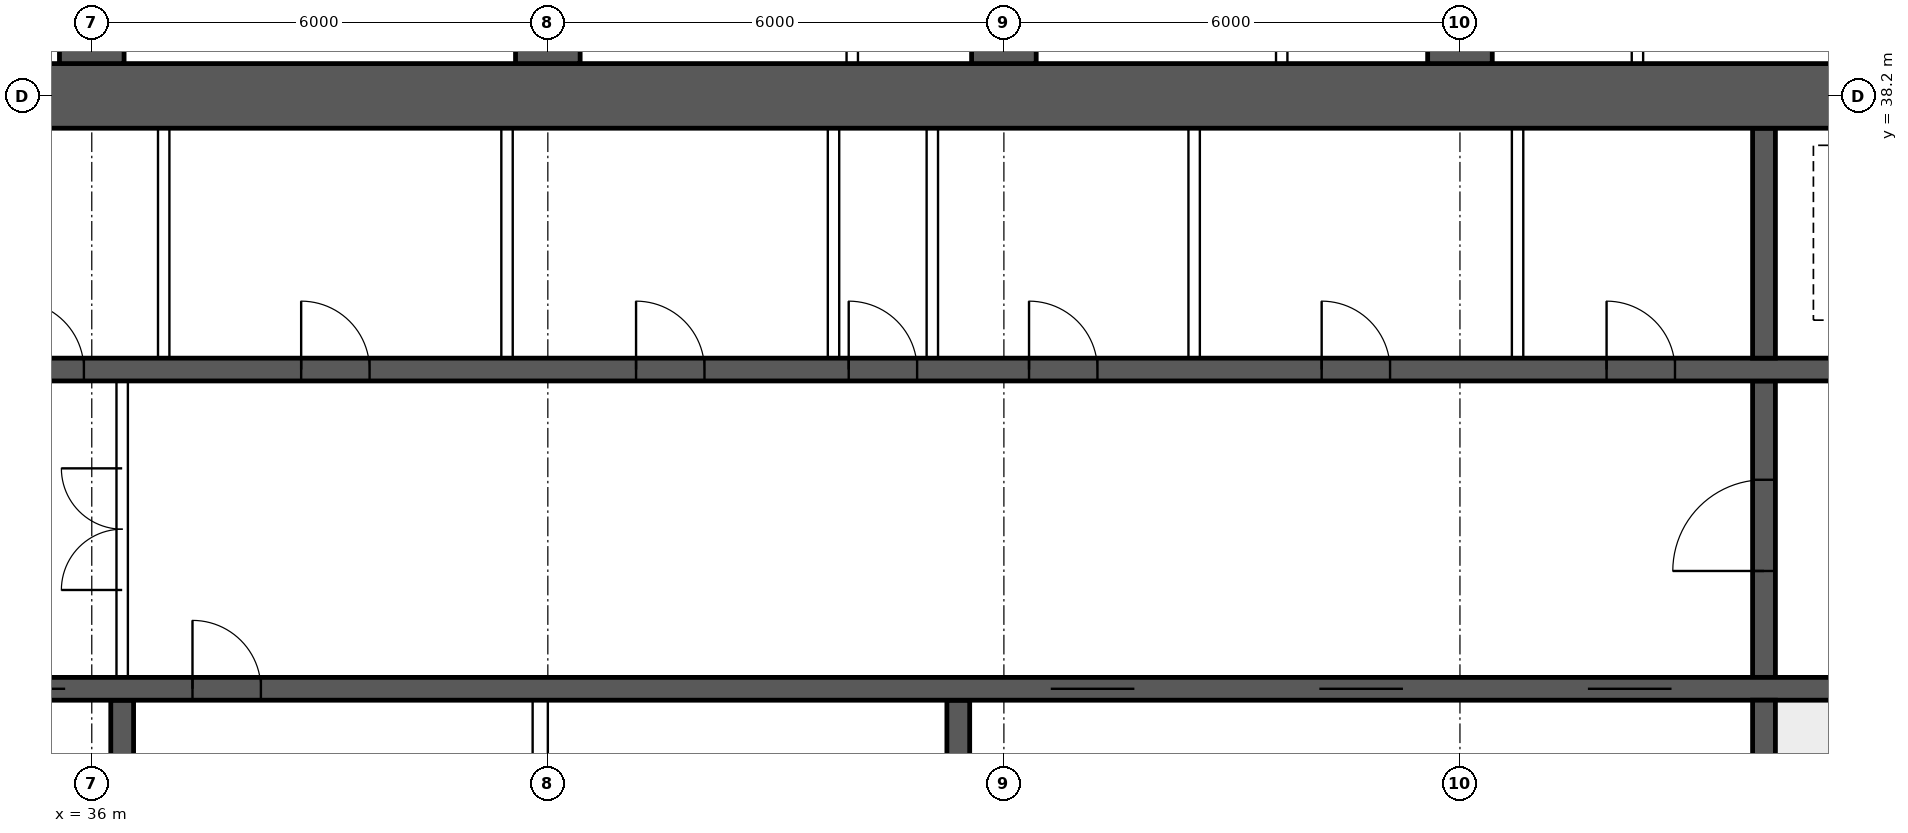
"""IFC4 building model, lengths in metres.
Left out: names, types, materials, properties, quantities, classifications, styles, units other than length and angle.
Written with IfcOpenShell. Run it as: python <this file> out.ifc"""

import sys

from ifc_helpers import new_model, si_unit, direction, frame, frame_2d, origin, place, context, subcontext, project, spatial, rectangle, extrude, element, fill, save


model = new_model("IFC4")
c1 = context("Model", 3, precision=1e-05, world=origin(), true_north=direction((0.0, 1.0)))
c2 = subcontext(c1, "Body", "Model", "MODEL_VIEW")
j1 = project(units=[si_unit("LENGTHUNIT", "METRE"), si_unit("PLANEANGLEUNIT", "RADIAN")], contexts=[c1])
p1 = place(None, origin())
s1 = spatial("IfcSite", under=j1, at=p1, CompositionType="ELEMENT")
p2 = place(p1, origin())
s2 = spatial("IfcBuilding", under=s1, at=p2, CompositionType="ELEMENT")
p3 = place(p2, frame((0.0, 0.0, 163.6)))
s3 = spatial("IfcBuildingStorey", under=s2, at=p3, CompositionType="ELEMENT", Elevation=163.6)
p4 = place(p3, frame((18.0, 38.2, 0.0), z_axis=(0.0, 0.0, 1.0), x_axis=(1.0, 0.0, 0.0)))
e1 = element("IfcWall", 1, at=p4, inside=s3, PredefinedType="SHEAR", context=c2, shape_type="SweptSolid", body=[
    extrude(rectangle(XDim=48.0, YDim=0.85, at=frame_2d((24.0, 0.0))), origin(), (0.0, 0.0, 1.0), 3.75),
])
p5 = place(p3, frame((18.425, 30.4, 0.0), z_axis=(0.0, 0.0, 1.0), x_axis=(1.0, 0.0, 0.0)))
e2 = element("IfcWall", 2, at=p5, inside=s3, PredefinedType="SHEAR", context=c2, shape_type="SweptSolid", body=[
    extrude(rectangle(XDim=47.15, YDim=0.3, at=frame_2d((23.575, 0.0))), origin(), (0.0, 0.0, 1.0), 3.75),
])
p6 = place(p5, frame((0.4, 0.0, 0.0)))
e3 = element("IfcOpeningElement", 3, at=p6, cuts=e2, PredefinedType="OPENING", context=c2, shape_type="SweptSolid", body=[
    extrude(rectangle(XDim=1.0, YDim=2.1, at=frame_2d((0.5, 1.05))), frame((0.0, 0.16, 0.0), z_axis=(0.0, -1.0, 0.0), x_axis=(1.0, 0.0, 0.0)), (0.0, 0.0, 1.0), 0.32),
])
p7 = place(p5, frame((45.75, 0.0, 0.0)))
e4 = element("IfcOpeningElement", 4, at=p7, cuts=e2, PredefinedType="OPENING", context=c2, shape_type="SweptSolid", body=[
    extrude(rectangle(XDim=1.0, YDim=2.1, at=frame_2d((0.5, 1.05))), frame((0.0, 0.16, 0.0), z_axis=(0.0, -1.0, 0.0), x_axis=(1.0, 0.0, 0.0)), (0.0, 0.0, 1.0), 0.32),
])
p8 = place(p5, frame((8.325, 0.0, 0.0)))
e5 = element("IfcOpeningElement", 5, at=p8, cuts=e2, PredefinedType="OPENING", context=c2, shape_type="SweptSolid", body=[
    extrude(rectangle(XDim=1.1, YDim=2.1, at=frame_2d((0.55, 1.05))), frame((0.0, 0.16, 0.0), z_axis=(0.0, -1.0, 0.0), x_axis=(1.0, 0.0, 0.0)), (0.0, 0.0, 1.0), 0.32),
])
p9 = place(p5, frame((10.925, 0.0, 0.0)))
e6 = element("IfcOpeningElement", 6, at=p9, cuts=e2, PredefinedType="OPENING", context=c2, shape_type="SweptSolid", body=[
    extrude(rectangle(XDim=1.1, YDim=2.1, at=frame_2d((0.55, 1.05))), frame((0.0, 0.16, 0.0), z_axis=(0.0, -1.0, 0.0), x_axis=(1.0, 0.0, 0.0)), (0.0, 0.0, 1.0), 0.32),
])
p10 = place(p5, frame((13.525, 0.0, 0.0)))
e7 = element("IfcOpeningElement", 7, at=p10, cuts=e2, PredefinedType="OPENING", context=c2, shape_type="SweptSolid", body=[
    extrude(rectangle(XDim=1.1, YDim=2.1, at=frame_2d((0.55, 1.05))), frame((0.0, 0.16, 0.0), z_axis=(0.0, -1.0, 0.0), x_axis=(1.0, 0.0, 0.0)), (0.0, 0.0, 1.0), 0.32),
])
p11 = place(p5, frame((16.125, 0.0, 0.0)))
e8 = element("IfcOpeningElement", 8, at=p11, cuts=e2, PredefinedType="OPENING", context=c2, shape_type="SweptSolid", body=[
    extrude(rectangle(XDim=1.1, YDim=2.1, at=frame_2d((0.55, 1.05))), frame((0.0, 0.16, 0.0), z_axis=(0.0, -1.0, 0.0), x_axis=(1.0, 0.0, 0.0)), (0.0, 0.0, 1.0), 0.32),
])
p12 = place(p5, frame((18.9, 0.0, 0.0)))
e9 = element("IfcOpeningElement", 9, at=p12, cuts=e2, PredefinedType="OPENING", context=c2, shape_type="SweptSolid", body=[
    extrude(rectangle(XDim=0.9, YDim=2.1, at=frame_2d((0.45, 1.05))), frame((0.0, 0.16, 0.0), z_axis=(0.0, -1.0, 0.0), x_axis=(1.0, 0.0, 0.0)), (0.0, 0.0, 1.0), 0.32),
])
p13 = place(p5, frame((30.192, 0.0, 0.0)))
e10 = element("IfcOpeningElement", 10, at=p13, cuts=e2, PredefinedType="OPENING", context=c2, shape_type="SweptSolid", body=[
    extrude(rectangle(XDim=1.1, YDim=2.1, at=frame_2d((0.55, 1.05))), frame((0.0, 0.16, 0.0), z_axis=(0.0, -1.0, 0.0), x_axis=(1.0, 0.0, 0.0)), (0.0, 0.0, 1.0), 0.32),
])
p14 = place(p5, frame((33.725, 0.0, 0.0)))
e11 = element("IfcOpeningElement", 11, at=p14, cuts=e2, PredefinedType="OPENING", context=c2, shape_type="SweptSolid", body=[
    extrude(rectangle(XDim=1.1, YDim=2.1, at=frame_2d((0.55, 1.05))), frame((0.0, 0.16, 0.0), z_axis=(0.0, -1.0, 0.0), x_axis=(1.0, 0.0, 0.0)), (0.0, 0.0, 1.0), 0.32),
])
p15 = place(p5, frame((37.258, 0.0, 0.0)))
e12 = element("IfcOpeningElement", 12, at=p15, cuts=e2, PredefinedType="OPENING", context=c2, shape_type="SweptSolid", body=[
    extrude(rectangle(XDim=1.1, YDim=2.1, at=frame_2d((0.55, 1.05))), frame((0.0, 0.16, 0.0), z_axis=(0.0, -1.0, 0.0), x_axis=(1.0, 0.0, 0.0)), (0.0, 0.0, 1.0), 0.32),
])
p16 = place(p3, frame((18.425, 34.6, 0.0), z_axis=(0.0, 0.0, 1.0), x_axis=(1.0, 0.0, 0.0)))
e13 = element("IfcWall", 13, at=p16, inside=s3, PredefinedType="SHEAR", context=c2, shape_type="SweptSolid", body=[
    extrude(rectangle(XDim=47.15, YDim=0.3, at=frame_2d((23.575, 0.0))), origin(), (0.0, 0.0, 1.0), 3.75),
])
p17 = place(p16, frame((0.9, 0.0, 0.0)))
e14 = element("IfcOpeningElement", 14, at=p17, cuts=e13, PredefinedType="OPENING", context=c2, shape_type="SweptSolid", body=[
    extrude(rectangle(XDim=1.1, YDim=2.1, at=frame_2d((0.55, 1.05))), frame((0.0, 0.16, 0.0), z_axis=(0.0, -1.0, 0.0), x_axis=(1.0, 0.0, 0.0)), (0.0, 0.0, 1.0), 0.32),
])
p18 = place(p16, frame((45.15, 0.0, 0.0)))
e15 = element("IfcOpeningElement", 15, at=p18, cuts=e13, PredefinedType="OPENING", context=c2, shape_type="SweptSolid", body=[
    extrude(rectangle(XDim=1.1, YDim=2.1, at=frame_2d((0.55, 1.05))), frame((0.0, 0.16, 0.0), z_axis=(0.0, -1.0, 0.0), x_axis=(1.0, 0.0, 0.0)), (0.0, 0.0, 1.0), 0.32),
])
p19 = place(p16, frame((4.175, 0.0, 0.0)))
e16 = element("IfcOpeningElement", 16, at=p19, cuts=e13, PredefinedType="OPENING", context=c2, shape_type="SweptSolid", body=[
    extrude(rectangle(XDim=0.9, YDim=2.1, at=frame_2d((0.45, 1.05))), frame((0.0, 0.16, 0.0), z_axis=(0.0, -1.0, 0.0), x_axis=(1.0, 0.0, 0.0)), (0.0, 0.0, 1.0), 0.32),
])
p20 = place(p16, frame((42.075, 0.0, 0.0)))
e17 = element("IfcOpeningElement", 17, at=p20, cuts=e13, PredefinedType="OPENING", context=c2, shape_type="SweptSolid", body=[
    extrude(rectangle(XDim=0.9, YDim=2.1, at=frame_2d((0.45, 1.05))), frame((0.0, 0.16, 0.0), z_axis=(0.0, -1.0, 0.0), x_axis=(1.0, 0.0, 0.0)), (0.0, 0.0, 1.0), 0.32),
])
p21 = place(p16, frame((8.95, 0.0, 0.0)))
e18 = element("IfcOpeningElement", 18, at=p21, cuts=e13, PredefinedType="OPENING", context=c2, shape_type="SweptSolid", body=[
    extrude(rectangle(XDim=0.9, YDim=2.1, at=frame_2d((0.45, 1.05))), frame((0.0, 0.16, 0.0), z_axis=(0.0, -1.0, 0.0), x_axis=(1.0, 0.0, 0.0)), (0.0, 0.0, 1.0), 0.32),
])
p22 = place(p16, frame((12.924, 0.0, 0.0)))
e19 = element("IfcOpeningElement", 19, at=p22, cuts=e13, PredefinedType="OPENING", context=c2, shape_type="SweptSolid", body=[
    extrude(rectangle(XDim=0.9, YDim=2.1, at=frame_2d((0.45, 1.05))), frame((0.0, 0.16, 0.0), z_axis=(0.0, -1.0, 0.0), x_axis=(1.0, 0.0, 0.0)), (0.0, 0.0, 1.0), 0.32),
])
p23 = place(p16, frame((16.571, 0.0, 0.0)))
e20 = element("IfcOpeningElement", 20, at=p23, cuts=e13, PredefinedType="OPENING", context=c2, shape_type="SweptSolid", body=[
    extrude(rectangle(XDim=0.9, YDim=2.1, at=frame_2d((0.45, 1.05))), frame((0.0, 0.16, 0.0), z_axis=(0.0, -1.0, 0.0), x_axis=(1.0, 0.0, 0.0)), (0.0, 0.0, 1.0), 0.32),
])
p24 = place(p16, frame((20.33, 0.0, 0.0)))
e21 = element("IfcOpeningElement", 21, at=p24, cuts=e13, PredefinedType="OPENING", context=c2, shape_type="SweptSolid", body=[
    extrude(rectangle(XDim=0.9, YDim=2.1, at=frame_2d((0.45, 1.05))), frame((0.0, 0.16, 0.0), z_axis=(0.0, -1.0, 0.0), x_axis=(1.0, 0.0, 0.0)), (0.0, 0.0, 1.0), 0.32),
])
p25 = place(p16, frame((24.736, 0.0, 0.0)))
e22 = element("IfcOpeningElement", 22, at=p25, cuts=e13, PredefinedType="OPENING", context=c2, shape_type="SweptSolid", body=[
    extrude(rectangle(XDim=0.9, YDim=2.1, at=frame_2d((0.45, 1.05))), frame((0.0, 0.16, 0.0), z_axis=(0.0, -1.0, 0.0), x_axis=(1.0, 0.0, 0.0)), (0.0, 0.0, 1.0), 0.32),
])
p26 = place(p16, frame((27.533, 0.0, 0.0)))
e23 = element("IfcOpeningElement", 23, at=p26, cuts=e13, PredefinedType="OPENING", context=c2, shape_type="SweptSolid", body=[
    extrude(rectangle(XDim=0.9, YDim=2.1, at=frame_2d((0.45, 1.05))), frame((0.0, 0.16, 0.0), z_axis=(0.0, -1.0, 0.0), x_axis=(1.0, 0.0, 0.0)), (0.0, 0.0, 1.0), 0.32),
])
p27 = place(p16, frame((29.906, 0.0, 0.0)))
e24 = element("IfcOpeningElement", 24, at=p27, cuts=e13, PredefinedType="OPENING", context=c2, shape_type="SweptSolid", body=[
    extrude(rectangle(XDim=0.9, YDim=2.1, at=frame_2d((0.45, 1.05))), frame((0.0, 0.16, 0.0), z_axis=(0.0, -1.0, 0.0), x_axis=(1.0, 0.0, 0.0)), (0.0, 0.0, 1.0), 0.32),
])
p28 = place(p16, frame((33.756, 0.0, 0.0)))
e25 = element("IfcOpeningElement", 25, at=p28, cuts=e13, PredefinedType="OPENING", context=c2, shape_type="SweptSolid", body=[
    extrude(rectangle(XDim=0.9, YDim=2.1, at=frame_2d((0.45, 1.05))), frame((0.0, 0.16, 0.0), z_axis=(0.0, -1.0, 0.0), x_axis=(1.0, 0.0, 0.0)), (0.0, 0.0, 1.0), 0.32),
])
p29 = place(p16, frame((37.504, 0.0, 0.0)))
e26 = element("IfcOpeningElement", 26, at=p29, cuts=e13, PredefinedType="OPENING", context=c2, shape_type="SweptSolid", body=[
    extrude(rectangle(XDim=0.9, YDim=2.1, at=frame_2d((0.45, 1.05))), frame((0.0, 0.16, 0.0), z_axis=(0.0, -1.0, 0.0), x_axis=(1.0, 0.0, 0.0)), (0.0, 0.0, 1.0), 0.32),
])
p30 = place(p3, frame((58.0, 26.225, 0.0), z_axis=(0.0, 0.0, 1.0), x_axis=(0.0, 1.0, 0.0)))
e27 = element("IfcWall", 27, at=p30, inside=s3, PredefinedType="SHEAR", context=c2, shape_type="SweptSolid", body=[
    extrude(rectangle(XDim=4.025, YDim=0.3, at=frame_2d((2.012, 0.0))), origin(), (0.0, 0.0, 1.0), 3.75),
])
p31 = place(p3, frame((58.0, 30.55, 0.0), z_axis=(0.0, 0.0, 1.0), x_axis=(0.0, 1.0, 0.0)))
e28 = element("IfcWall", 28, at=p31, inside=s3, PredefinedType="SHEAR", context=c2, shape_type="SweptSolid", body=[
    extrude(rectangle(XDim=3.9, YDim=0.3, at=frame_2d((1.95, 0.0))), origin(), (0.0, 0.0, 1.0), 3.75),
])
p32 = place(p31, frame((1.4, 0.0, 0.0)))
e29 = element("IfcOpeningElement", 29, at=p32, cuts=e28, PredefinedType="OPENING", context=c2, shape_type="SweptSolid", body=[
    extrude(rectangle(XDim=1.2, YDim=2.1, at=frame_2d((0.6, 1.05))), frame((0.0, 0.16, 0.0), z_axis=(0.0, -1.0, 0.0), x_axis=(1.0, 0.0, 0.0)), (0.0, 0.0, 1.0), 0.32),
])
p33 = place(p3, frame((58.0, 34.75, 0.0), z_axis=(0.0, 0.0, 1.0), x_axis=(0.0, 1.0, 0.0)))
e30 = element("IfcWall", 30, at=p33, inside=s3, PredefinedType="SHEAR", context=c2, shape_type="SweptSolid", body=[
    extrude(rectangle(XDim=3.025, YDim=0.3, at=frame_2d((1.512, 0.0))), origin(), (0.0, 0.0, 1.0), 3.75),
])
for number, where, z_axis, x_axis in (
    (31, (36.4, 26.225, 0.0), (0.0, 0.0, 1.0), (0.0, 1.0, 0.0)),
    (32, (47.4, 26.225, 0.0), (0.0, 0.0, 1.0), (0.0, 1.0, 0.0)),
):
    element("IfcWall", number, at=place(p3, frame(where, z_axis=z_axis, x_axis=x_axis)), inside=s3, PredefinedType="SHEAR", context=c2, shape_type="SweptSolid", body=[
        extrude(rectangle(XDim=4.025, YDim=0.3, at=frame_2d((2.012, 0.0))), origin(), (0.0, 0.0, 1.0), 3.75),
    ])
for number, where, z_axis, x_axis in (
    (33, (36.0, 38.625, 0.0), (0.0, 0.0, 1.0), (0.0, 1.0, 0.0)),
    (34, (42.0, 38.625, 0.0), (0.0, 0.0, 1.0), (0.0, 1.0, 0.0)),
    (35, (48.0, 38.625, 0.0), (0.0, 0.0, 1.0), (0.0, 1.0, 0.0)),
    (36, (54.0, 38.625, 0.0), (0.0, 0.0, 1.0), (0.0, 1.0, 0.0)),
):
    element("IfcWall", number, at=place(p3, frame(where, z_axis=z_axis, x_axis=x_axis)), inside=s3, PredefinedType="SHEAR", context=c2, shape_type="SweptSolid", body=[
        extrude(rectangle(XDim=8.175, YDim=0.85, at=frame_2d((4.087, 0.0))), origin(), (0.0, 0.0, 1.0), 3.75),
    ])
p34 = place(p3, frame((36.4, 30.55, 0.0), z_axis=(0.0, 0.0, 1.0), x_axis=(0.0, 1.0, 0.0)))
e37 = element("IfcWall", 37, at=p34, inside=s3, PredefinedType="SOLIDWALL", context=c2, shape_type="SweptSolid", body=[
    extrude(rectangle(XDim=3.9, YDim=0.15, at=frame_2d((1.95, 0.0))), origin(), (0.0, 0.0, 1.0), 3.5),
])
p35 = place(p34, frame((1.15, 0.0, 0.0)))
e38 = element("IfcOpeningElement", 38, at=p35, cuts=e37, PredefinedType="OPENING", context=c2, shape_type="SweptSolid", body=[
    extrude(rectangle(XDim=1.6, YDim=2.1, at=frame_2d((0.8, 1.05))), frame((0.0, 0.085, 0.0), z_axis=(0.0, -1.0, 0.0), x_axis=(1.0, 0.0, 0.0)), (0.0, 0.0, 1.0), 0.17),
])
for number, where, z_axis, x_axis in (
    (39, (36.946, 34.75, 0.0), (0.0, 0.0, 1.0), (0.0, 1.0, 0.0)),
    (40, (41.463, 34.75, 0.0), (0.0, 0.0, 1.0), (0.0, 1.0, 0.0)),
    (41, (45.758, 34.75, 0.0), (0.0, 0.0, 1.0), (0.0, 1.0, 0.0)),
    (42, (47.058, 34.75, 0.0), (0.0, 0.0, 1.0), (0.0, 1.0, 0.0)),
    (43, (50.503, 34.75, 0.0), (0.0, 0.0, 1.0), (0.0, 1.0, 0.0)),
    (44, (54.758, 34.75, 0.0), (0.0, 0.0, 1.0), (0.0, 1.0, 0.0)),
):
    element("IfcWall", number, at=place(p3, frame(where, z_axis=z_axis, x_axis=x_axis)), inside=s3, PredefinedType="SOLIDWALL", context=c2, shape_type="SweptSolid", body=[
        extrude(rectangle(XDim=3.025, YDim=0.15, at=frame_2d((1.512, 0.0))), origin(), (0.0, 0.0, 1.0), 3.5),
    ])
p36 = place(p3, frame((41.9, 26.225, 0.0), z_axis=(0.0, 0.0, 1.0), x_axis=(0.0, 1.0, 0.0)))
e45 = element("IfcWall", 45, at=p36, inside=s3, PredefinedType="SOLIDWALL", context=c2, shape_type="SweptSolid", body=[
    extrude(rectangle(XDim=4.025, YDim=0.2, at=frame_2d((2.012, 0.0))), origin(), (0.0, 0.0, 1.0), 3.5),
])
for number, where, z_axis, x_axis in (
    (46, (46.005, 38.625, 0.0), (0.0, 0.0, 1.0), (0.0, 1.0, 0.0)),
    (47, (51.655, 38.625, 0.0), (0.0, 0.0, 1.0), (0.0, 1.0, 0.0)),
    (48, (56.335, 38.625, 0.0), (0.0, 0.0, 1.0), (0.0, 1.0, 0.0)),
):
    element("IfcWall", number, at=place(p3, frame(where, z_axis=z_axis, x_axis=x_axis)), inside=s3, PredefinedType="PARTITIONING", context=c2, shape_type="SweptSolid", body=[
        extrude(rectangle(XDim=8.075, YDim=0.15, at=frame_2d((4.038, 0.0))), origin(), (0.0, 0.0, 1.0), 3.5),
    ])
p37 = place(p35, origin())
e49 = element("IfcDoor", 49, at=p37, inside=s3, OperationType="DOUBLE_DOOR_SINGLE_SWING", PredefinedType="DOOR", context=c2, shape_type="SweptSolid", body=[
    extrude(rectangle(XDim=1.6, YDim=2.1, at=frame_2d((0.8, 1.05))), frame((0.0, 0.025, 0.0), z_axis=(0.0, -1.0, 0.0), x_axis=(1.0, 0.0, 0.0)), (0.0, 0.0, 1.0), 0.05),
])
fill(e38, e49)
p38 = place(p32, origin())
e50 = element("IfcDoor", 50, at=p38, inside=s3, OperationType="SINGLE_SWING_LEFT", PredefinedType="DOOR", context=c2, shape_type="SweptSolid", body=[
    extrude(rectangle(XDim=1.2, YDim=2.1, at=frame_2d((0.6, 1.05))), frame((0.0, 0.025, 0.0), z_axis=(0.0, -1.0, 0.0), x_axis=(1.0, 0.0, 0.0)), (0.0, 0.0, 1.0), 0.05),
])
fill(e29, e50)
p39 = place(p23, origin())
e51 = element("IfcDoor", 51, at=p39, inside=s3, OperationType="SINGLE_SWING_LEFT", PredefinedType="DOOR", context=c2, shape_type="SweptSolid", body=[
    extrude(rectangle(XDim=0.9, YDim=2.1, at=frame_2d((0.45, 1.05))), frame((0.0, 0.025, 0.0), z_axis=(0.0, -1.0, 0.0), x_axis=(1.0, 0.0, 0.0)), (0.0, 0.0, 1.0), 0.05),
])
fill(e20, e51)
p40 = place(p24, origin())
e52 = element("IfcDoor", 52, at=p40, inside=s3, OperationType="SINGLE_SWING_LEFT", PredefinedType="DOOR", context=c2, shape_type="SweptSolid", body=[
    extrude(rectangle(XDim=0.9, YDim=2.1, at=frame_2d((0.45, 1.05))), frame((0.0, 0.025, 0.0), z_axis=(0.0, -1.0, 0.0), x_axis=(1.0, 0.0, 0.0)), (0.0, 0.0, 1.0), 0.05),
])
fill(e21, e52)
p41 = place(p25, origin())
e53 = element("IfcDoor", 53, at=p41, inside=s3, OperationType="SINGLE_SWING_LEFT", PredefinedType="DOOR", context=c2, shape_type="SweptSolid", body=[
    extrude(rectangle(XDim=0.9, YDim=2.1, at=frame_2d((0.45, 1.05))), frame((0.0, 0.025, 0.0), z_axis=(0.0, -1.0, 0.0), x_axis=(1.0, 0.0, 0.0)), (0.0, 0.0, 1.0), 0.05),
])
fill(e22, e53)
p42 = place(p26, origin())
e54 = element("IfcDoor", 54, at=p42, inside=s3, OperationType="SINGLE_SWING_LEFT", PredefinedType="DOOR", context=c2, shape_type="SweptSolid", body=[
    extrude(rectangle(XDim=0.9, YDim=2.1, at=frame_2d((0.45, 1.05))), frame((0.0, 0.025, 0.0), z_axis=(0.0, -1.0, 0.0), x_axis=(1.0, 0.0, 0.0)), (0.0, 0.0, 1.0), 0.05),
])
fill(e23, e54)
p43 = place(p27, origin())
e55 = element("IfcDoor", 55, at=p43, inside=s3, OperationType="SINGLE_SWING_LEFT", PredefinedType="DOOR", context=c2, shape_type="SweptSolid", body=[
    extrude(rectangle(XDim=0.9, YDim=2.1, at=frame_2d((0.45, 1.05))), frame((0.0, 0.025, 0.0), z_axis=(0.0, -1.0, 0.0), x_axis=(1.0, 0.0, 0.0)), (0.0, 0.0, 1.0), 0.05),
])
fill(e24, e55)
p44 = place(p28, origin())
e56 = element("IfcDoor", 56, at=p44, inside=s3, OperationType="SINGLE_SWING_LEFT", PredefinedType="DOOR", context=c2, shape_type="SweptSolid", body=[
    extrude(rectangle(XDim=0.9, YDim=2.1, at=frame_2d((0.45, 1.05))), frame((0.0, 0.025, 0.0), z_axis=(0.0, -1.0, 0.0), x_axis=(1.0, 0.0, 0.0)), (0.0, 0.0, 1.0), 0.05),
])
fill(e25, e56)
p45 = place(p29, origin())
e57 = element("IfcDoor", 57, at=p45, inside=s3, OperationType="SINGLE_SWING_LEFT", PredefinedType="DOOR", context=c2, shape_type="SweptSolid", body=[
    extrude(rectangle(XDim=0.9, YDim=2.1, at=frame_2d((0.45, 1.05))), frame((0.0, 0.025, 0.0), z_axis=(0.0, -1.0, 0.0), x_axis=(1.0, 0.0, 0.0)), (0.0, 0.0, 1.0), 0.05),
])
fill(e26, e57)
p46 = place(p11, origin())
e58 = element("IfcDoor", 58, at=p46, inside=s3, OperationType="DOUBLE_DOOR_SLIDING", PredefinedType="DOOR", context=c2, shape_type="SweptSolid", body=[
    extrude(rectangle(XDim=1.1, YDim=2.1, at=frame_2d((0.55, 1.05))), frame((0.0, 0.025, 0.0), z_axis=(0.0, -1.0, 0.0), x_axis=(1.0, 0.0, 0.0)), (0.0, 0.0, 1.0), 0.05),
])
fill(e8, e58)
p47 = place(p12, origin())
e59 = element("IfcDoor", 59, at=p47, inside=s3, OperationType="SINGLE_SWING_LEFT", PredefinedType="DOOR", context=c2, shape_type="SweptSolid", body=[
    extrude(rectangle(XDim=0.9, YDim=2.1, at=frame_2d((0.45, 1.05))), frame((0.0, 0.025, 0.0), z_axis=(0.0, -1.0, 0.0), x_axis=(1.0, 0.0, 0.0)), (0.0, 0.0, 1.0), 0.05),
])
fill(e9, e59)
p48 = place(p13, origin())
e60 = element("IfcDoor", 60, at=p48, inside=s3, OperationType="DOUBLE_DOOR_SLIDING", PredefinedType="DOOR", context=c2, shape_type="SweptSolid", body=[
    extrude(rectangle(XDim=1.1, YDim=2.1, at=frame_2d((0.55, 1.05))), frame((0.0, 0.025, 0.0), z_axis=(0.0, -1.0, 0.0), x_axis=(1.0, 0.0, 0.0)), (0.0, 0.0, 1.0), 0.05),
])
fill(e10, e60)
p49 = place(p14, origin())
e61 = element("IfcDoor", 61, at=p49, inside=s3, OperationType="DOUBLE_DOOR_SLIDING", PredefinedType="DOOR", context=c2, shape_type="SweptSolid", body=[
    extrude(rectangle(XDim=1.1, YDim=2.1, at=frame_2d((0.55, 1.05))), frame((0.0, 0.025, 0.0), z_axis=(0.0, -1.0, 0.0), x_axis=(1.0, 0.0, 0.0)), (0.0, 0.0, 1.0), 0.05),
])
fill(e11, e61)
p50 = place(p15, origin())
e62 = element("IfcDoor", 62, at=p50, inside=s3, OperationType="DOUBLE_DOOR_SLIDING", PredefinedType="DOOR", context=c2, shape_type="SweptSolid", body=[
    extrude(rectangle(XDim=1.1, YDim=2.1, at=frame_2d((0.55, 1.05))), frame((0.0, 0.025, 0.0), z_axis=(0.0, -1.0, 0.0), x_axis=(1.0, 0.0, 0.0)), (0.0, 0.0, 1.0), 0.05),
])
fill(e12, e62)
save(model, sys.argv[1])
